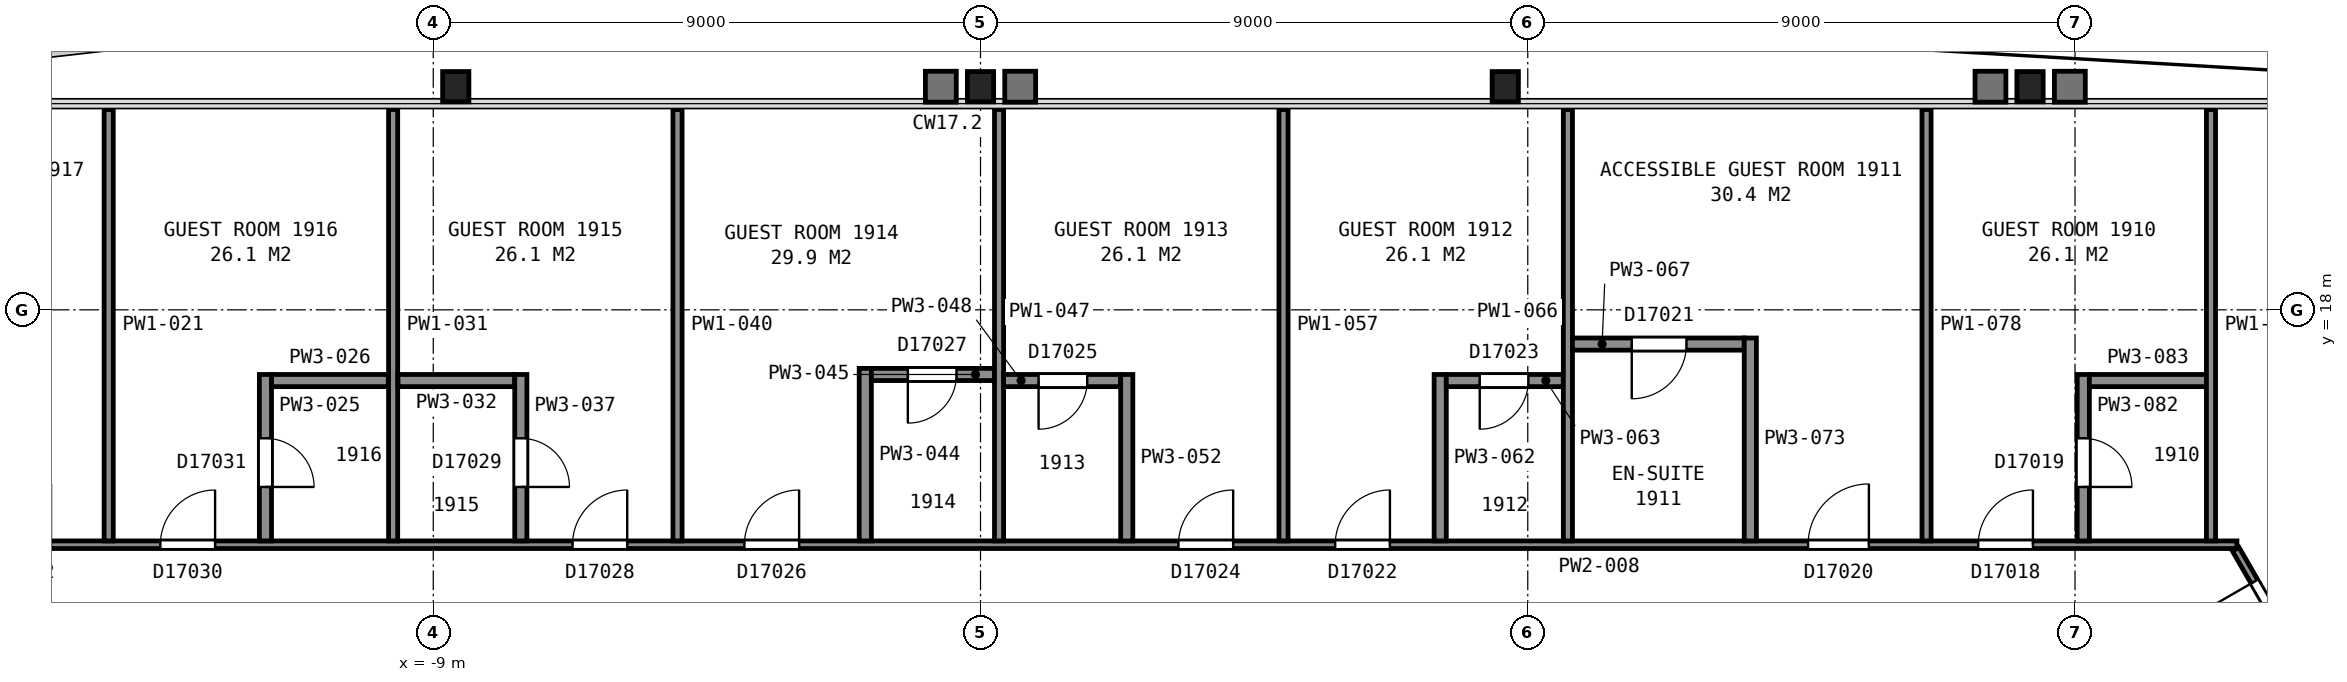
"""IFC4 building model, lengths in metres.
Left out: names, types, materials, properties, quantities, classifications, styles, units other than length and angle.
Written with IfcOpenShell. Run it as: python <this file> out.ifc"""

import sys

from ifc_helpers import new_model, si_unit, direction, frame, frame_2d, origin, origin_2d, place, context, subcontext, project, spatial, rectangle, i_section, extrude, element, fill, save


model = new_model("IFC4")
c1 = context("Model", 3, precision=1e-05, world=origin(), true_north=direction((0.0, 1.0)))
c2 = subcontext(c1, "Body", "Model", "MODEL_VIEW")
j1 = project(units=[si_unit("LENGTHUNIT", "METRE"), si_unit("PLANEANGLEUNIT", "RADIAN")], contexts=[c1])
p1 = place(None, origin())
s1 = spatial("IfcSite", under=j1, at=p1, CompositionType="ELEMENT")
p2 = place(p1, origin())
s2 = spatial("IfcBuilding", under=s1, at=p2, CompositionType="ELEMENT")
p3 = place(p2, frame((0.0, 0.0, 83.6)))
s3 = spatial("IfcBuildingStorey", under=s2, at=p3, CompositionType="ELEMENT", Elevation=83.6)
for number, where, z_axis, x_axis in (
    (1, (17.26, 21.67, 0.0), (0.0, 0.0, 1.0), (1.0, 0.0, 0.0)),
    (2, (8.63, 21.67, 0.0), (0.0, 0.0, 1.0), (1.0, 0.0, 0.0)),
    (3, (0.0, 21.67, 0.0), (0.0, 0.0, 1.0), (1.0, 0.0, 0.0)),
    (4, (-8.63, 21.67, 0.0), (0.0, 0.0, 1.0), (1.0, 0.0, 0.0)),
):
    element("IfcColumn", number, at=place(p3, frame(where, z_axis=z_axis, x_axis=x_axis)), inside=s3, PredefinedType="COLUMN", context=c2, shape_type="SweptSolid", body=[
        extrude(i_section(OverallWidth=0.432, OverallDepth=0.498, WebThickness=0.056, FlangeThickness=0.089, FilletRadius=0.015, at=origin_2d()), origin(), (0.0, 0.0, 1.0), 2.87),
    ])
p4 = place(p3, frame((-20.663, 14.137, 0.0), z_axis=(0.0, 0.0, 1.0), x_axis=(1.0, 0.0, 0.0)))
e5 = element("IfcWall", 5, at=p4, inside=s3, PredefinedType="PARTITIONING", context=c2, shape_type="SweptSolid", body=[
    extrude(rectangle(XDim=41.325, YDim=0.125, at=frame_2d((20.663, 0.0))), origin(), (0.0, 0.0, 1.0), 2.262),
])
p5 = place(p4, frame((37.071, 0.0, 0.0)))
e6 = element("IfcOpeningElement", 6, at=p5, cuts=e5, PredefinedType="OPENING", context=c2, shape_type="SweptSolid", body=[
    extrude(rectangle(XDim=0.9, YDim=2.1, at=frame_2d((0.45, 1.05))), frame((0.0, 0.073, 0.0), z_axis=(0.0, -1.0, 0.0), x_axis=(1.0, 0.0, 0.0)), (0.0, 0.0, 1.0), 0.145),
])
p6 = place(p4, frame((34.272, 0.0, 0.0)))
e7 = element("IfcOpeningElement", 7, at=p6, cuts=e5, PredefinedType="OPENING", context=c2, shape_type="SweptSolid", body=[
    extrude(rectangle(XDim=1.0, YDim=2.1, at=frame_2d((0.5, 1.05))), frame((0.0, 0.073, 0.0), z_axis=(0.0, -1.0, 0.0), x_axis=(1.0, 0.0, 0.0)), (0.0, 0.0, 1.0), 0.145),
])
p7 = place(p4, frame((26.496, 0.0, 0.0)))
e8 = element("IfcOpeningElement", 8, at=p7, cuts=e5, PredefinedType="OPENING", context=c2, shape_type="SweptSolid", body=[
    extrude(rectangle(XDim=0.9, YDim=2.1, at=frame_2d((0.45, 1.05))), frame((0.0, 0.073, 0.0), z_axis=(0.0, -1.0, 0.0), x_axis=(1.0, 0.0, 0.0)), (0.0, 0.0, 1.0), 0.145),
])
p8 = place(p4, frame((23.917, 0.0, 0.0)))
e9 = element("IfcOpeningElement", 9, at=p8, cuts=e5, PredefinedType="OPENING", context=c2, shape_type="SweptSolid", body=[
    extrude(rectangle(XDim=0.9, YDim=2.1, at=frame_2d((0.45, 1.05))), frame((0.0, 0.073, 0.0), z_axis=(0.0, -1.0, 0.0), x_axis=(1.0, 0.0, 0.0)), (0.0, 0.0, 1.0), 0.145),
])
p9 = place(p4, frame((16.78, 0.0, 0.0)))
e10 = element("IfcOpeningElement", 10, at=p9, cuts=e5, PredefinedType="OPENING", context=c2, shape_type="SweptSolid", body=[
    extrude(rectangle(XDim=0.9, YDim=2.1, at=frame_2d((0.45, 1.05))), frame((0.0, 0.073, 0.0), z_axis=(0.0, -1.0, 0.0), x_axis=(1.0, 0.0, 0.0)), (0.0, 0.0, 1.0), 0.145),
])
p10 = place(p4, frame((13.952, 0.0, 0.0)))
e11 = element("IfcOpeningElement", 11, at=p10, cuts=e5, PredefinedType="OPENING", context=c2, shape_type="SweptSolid", body=[
    extrude(rectangle(XDim=0.9, YDim=2.1, at=frame_2d((0.45, 1.05))), frame((0.0, 0.073, 0.0), z_axis=(0.0, -1.0, 0.0), x_axis=(1.0, 0.0, 0.0)), (0.0, 0.0, 1.0), 0.145),
])
p11 = place(p4, frame((7.175, 0.0, 0.0)))
e12 = element("IfcOpeningElement", 12, at=p11, cuts=e5, PredefinedType="OPENING", context=c2, shape_type="SweptSolid", body=[
    extrude(rectangle(XDim=0.9, YDim=2.1, at=frame_2d((0.45, 1.05))), frame((0.0, 0.073, 0.0), z_axis=(0.0, -1.0, 0.0), x_axis=(1.0, 0.0, 0.0)), (0.0, 0.0, 1.0), 0.145),
])
p12 = place(p4, frame((4.376, 0.0, 0.0)))
e13 = element("IfcOpeningElement", 13, at=p12, cuts=e5, PredefinedType="OPENING", context=c2, shape_type="SweptSolid", body=[
    extrude(rectangle(XDim=1.0, YDim=2.1, at=frame_2d((0.5, 1.05))), frame((0.0, 0.073, 0.0), z_axis=(0.0, -1.0, 0.0), x_axis=(1.0, 0.0, 0.0)), (0.0, 0.0, 1.0), 0.145),
])
p13 = place(p3, frame((-14.338, 14.199, 0.0), z_axis=(0.0, 0.0, 1.0), x_axis=(0.0, 1.0, 0.0)))
e14 = element("IfcWall", 14, at=p13, inside=s3, PredefinedType="PARTITIONING", context=c2, shape_type="SweptSolid", body=[
    extrude(rectangle(XDim=7.095, YDim=0.15, at=frame_2d((3.548, 0.0))), origin(), (0.0, 0.0, 1.0), 2.262),
])
p14 = place(p3, frame((-11.76, 16.937, 0.0), z_axis=(0.0, 0.0, 1.0), x_axis=(0.0, -1.0, 0.0)))
e15 = element("IfcWall", 15, at=p14, inside=s3, PredefinedType="PARTITIONING", context=c2, shape_type="SweptSolid", body=[
    extrude(rectangle(XDim=2.738, YDim=0.2, at=frame_2d((1.369, 0.0))), origin(), (0.0, 0.0, 1.0), 2.262),
])
p15 = place(p14, frame((1.05, 0.0, 0.0)))
e16 = element("IfcOpeningElement", 16, at=p15, cuts=e15, PredefinedType="OPENING", context=c2, shape_type="SweptSolid", body=[
    extrude(rectangle(XDim=0.8, YDim=2.1, at=frame_2d((0.4, 1.05))), frame((0.0, 0.11, 0.0), z_axis=(0.0, -1.0, 0.0), x_axis=(1.0, 0.0, 0.0)), (0.0, 0.0, 1.0), 0.22),
])
p16 = place(p3, frame((-11.66, 16.837, 0.0), z_axis=(0.0, 0.0, 1.0), x_axis=(1.0, 0.0, 0.0)))
e17 = element("IfcWall", 17, at=p16, inside=s3, PredefinedType="PARTITIONING", context=c2, shape_type="SweptSolid", body=[
    extrude(rectangle(XDim=1.92, YDim=0.2, at=frame_2d((0.96, 0.0))), origin(), (0.0, 0.0, 1.0), 2.262),
])
p17 = place(p3, frame((-9.66, 14.199, 0.0), z_axis=(0.0, 0.0, 1.0), x_axis=(0.0, 1.0, 0.0)))
e18 = element("IfcWall", 18, at=p17, inside=s3, PredefinedType="PARTITIONING", context=c2, shape_type="SweptSolid", body=[
    extrude(rectangle(XDim=7.095, YDim=0.15, at=frame_2d((3.548, 0.0))), origin(), (0.0, 0.0, 1.0), 2.262),
])
p18 = place(p3, frame((-9.58, 16.837, 0.0), z_axis=(0.0, 0.0, 1.0), x_axis=(1.0, 0.0, 0.0)))
e19 = element("IfcWall", 19, at=p18, inside=s3, PredefinedType="PARTITIONING", context=c2, shape_type="SweptSolid", body=[
    extrude(rectangle(XDim=1.92, YDim=0.2, at=frame_2d((0.96, 0.0))), origin(), (0.0, 0.0, 1.0), 2.262),
])
p19 = place(p3, frame((-7.56, 14.199, 0.0), z_axis=(0.0, 0.0, 1.0), x_axis=(0.0, 1.0, 0.0)))
e20 = element("IfcWall", 20, at=p19, inside=s3, PredefinedType="PARTITIONING", context=c2, shape_type="SweptSolid", body=[
    extrude(rectangle(XDim=2.738, YDim=0.2, at=frame_2d((1.369, 0.0))), origin(), (0.0, 0.0, 1.0), 2.262),
])
p20 = place(p19, frame((0.887, 0.0, 0.0)))
e21 = element("IfcOpeningElement", 21, at=p20, cuts=e20, PredefinedType="OPENING", context=c2, shape_type="SweptSolid", body=[
    extrude(rectangle(XDim=0.8, YDim=2.1, at=frame_2d((0.4, 1.05))), frame((0.0, 0.11, 0.0), z_axis=(0.0, -1.0, 0.0), x_axis=(1.0, 0.0, 0.0)), (0.0, 0.0, 1.0), 0.22),
])
p21 = place(p3, frame((-4.983, 14.199, 0.0), z_axis=(0.0, 0.0, 1.0), x_axis=(0.0, 1.0, 0.0)))
e22 = element("IfcWall", 22, at=p21, inside=s3, PredefinedType="PARTITIONING", context=c2, shape_type="SweptSolid", body=[
    extrude(rectangle(XDim=7.095, YDim=0.15, at=frame_2d((3.548, 0.0))), origin(), (0.0, 0.0, 1.0), 2.262),
])
p22 = place(p3, frame((-1.895, 14.199, 0.0), z_axis=(0.0, 0.0, 1.0), x_axis=(0.0, 1.0, 0.0)))
e23 = element("IfcWall", 23, at=p22, inside=s3, PredefinedType="PARTITIONING", context=c2, shape_type="SweptSolid", body=[
    extrude(rectangle(XDim=2.838, YDim=0.2, at=frame_2d((1.419, 0.0))), origin(), (0.0, 0.0, 1.0), 2.262),
])
p23 = place(p3, frame((0.23, 16.937, 0.0), z_axis=(0.0, 0.0, 1.0), x_axis=(-1.0, 0.0, 0.0)))
e24 = element("IfcWall", 24, at=p23, inside=s3, PredefinedType="PARTITIONING", context=c2, shape_type="SweptSolid", body=[
    extrude(rectangle(XDim=2.025, YDim=0.2, at=frame_2d((1.012, 0.0))), origin(), (0.0, 0.0, 1.0), 2.262),
])
p24 = place(p23, frame((0.625, 0.0, 0.0)))
e25 = element("IfcOpeningElement", 25, at=p24, cuts=e24, PredefinedType="OPENING", context=c2, shape_type="SweptSolid", body=[
    extrude(rectangle(XDim=0.8, YDim=2.1, at=frame_2d((0.4, 1.05))), frame((0.0, 0.11, 0.0), z_axis=(0.0, -1.0, 0.0), x_axis=(1.0, 0.0, 0.0)), (0.0, 0.0, 1.0), 0.22),
])
p25 = place(p3, frame((0.305, 14.199, 0.0), z_axis=(0.0, 0.0, 1.0), x_axis=(0.0, 1.0, 0.0)))
e26 = element("IfcWall", 26, at=p25, inside=s3, PredefinedType="PARTITIONING", context=c2, shape_type="SweptSolid", body=[
    extrude(rectangle(XDim=7.095, YDim=0.15, at=frame_2d((3.548, 0.0))), origin(), (0.0, 0.0, 1.0), 2.262),
])
p26 = place(p3, frame((2.305, 16.837, 0.0), z_axis=(0.0, 0.0, 1.0), x_axis=(-1.0, 0.0, 0.0)))
e27 = element("IfcWall", 27, at=p26, inside=s3, PredefinedType="PARTITIONING", context=c2, shape_type="SweptSolid", body=[
    extrude(rectangle(XDim=1.925, YDim=0.2, at=frame_2d((0.962, 0.0))), origin(), (0.0, 0.0, 1.0), 2.262),
])
p27 = place(p26, frame((0.55, 0.0, 0.0)))
e28 = element("IfcOpeningElement", 28, at=p27, cuts=e27, PredefinedType="OPENING", context=c2, shape_type="SweptSolid", body=[
    extrude(rectangle(XDim=0.8, YDim=2.1, at=frame_2d((0.4, 1.05))), frame((0.0, 0.11, 0.0), z_axis=(0.0, -1.0, 0.0), x_axis=(1.0, 0.0, 0.0)), (0.0, 0.0, 1.0), 0.22),
])
p28 = place(p3, frame((2.405, 14.199, 0.0), z_axis=(0.0, 0.0, 1.0), x_axis=(0.0, 1.0, 0.0)))
e29 = element("IfcWall", 29, at=p28, inside=s3, PredefinedType="PARTITIONING", context=c2, shape_type="SweptSolid", body=[
    extrude(rectangle(XDim=2.738, YDim=0.2, at=frame_2d((1.369, 0.0))), origin(), (0.0, 0.0, 1.0), 2.262),
])
p29 = place(p3, frame((4.983, 14.199, 0.0), z_axis=(0.0, 0.0, 1.0), x_axis=(0.0, 1.0, 0.0)))
e30 = element("IfcWall", 30, at=p29, inside=s3, PredefinedType="PARTITIONING", context=c2, shape_type="SweptSolid", body=[
    extrude(rectangle(XDim=7.095, YDim=0.15, at=frame_2d((3.548, 0.0))), origin(), (0.0, 0.0, 1.0), 2.262),
])
p30 = place(p3, frame((7.56, 14.199, 0.0), z_axis=(0.0, 0.0, 1.0), x_axis=(0.0, 1.0, 0.0)))
e31 = element("IfcWall", 31, at=p30, inside=s3, PredefinedType="PARTITIONING", context=c2, shape_type="SweptSolid", body=[
    extrude(rectangle(XDim=2.738, YDim=0.2, at=frame_2d((1.369, 0.0))), origin(), (0.0, 0.0, 1.0), 2.262),
])
p31 = place(p3, frame((9.585, 16.837, 0.0), z_axis=(0.0, 0.0, 1.0), x_axis=(-1.0, 0.0, 0.0)))
e32 = element("IfcWall", 32, at=p31, inside=s3, PredefinedType="PARTITIONING", context=c2, shape_type="SweptSolid", body=[
    extrude(rectangle(XDim=1.925, YDim=0.2, at=frame_2d((0.962, 0.0))), origin(), (0.0, 0.0, 1.0), 2.262),
])
p32 = place(p31, frame((0.575, 0.0, 0.0)))
e33 = element("IfcOpeningElement", 33, at=p32, cuts=e32, PredefinedType="OPENING", context=c2, shape_type="SweptSolid", body=[
    extrude(rectangle(XDim=0.8, YDim=2.1, at=frame_2d((0.4, 1.05))), frame((0.0, 0.11, 0.0), z_axis=(0.0, -1.0, 0.0), x_axis=(1.0, 0.0, 0.0)), (0.0, 0.0, 1.0), 0.22),
])
p33 = place(p3, frame((9.66, 14.199, 0.0), z_axis=(0.0, 0.0, 1.0), x_axis=(0.0, 1.0, 0.0)))
e34 = element("IfcWall", 34, at=p33, inside=s3, PredefinedType="PARTITIONING", context=c2, shape_type="SweptSolid", body=[
    extrude(rectangle(XDim=7.095, YDim=0.15, at=frame_2d((3.548, 0.0))), origin(), (0.0, 0.0, 1.0), 2.262),
])
p34 = place(p3, frame((12.56, 17.437, 0.0), z_axis=(0.0, 0.0, 1.0), x_axis=(-1.0, 0.0, 0.0)))
e35 = element("IfcWall", 35, at=p34, inside=s3, PredefinedType="PARTITIONING", context=c2, shape_type="SweptSolid", body=[
    extrude(rectangle(XDim=2.825, YDim=0.2, at=frame_2d((1.413, 0.0))), origin(), (0.0, 0.0, 1.0), 2.262),
])
p35 = place(p34, frame((0.95, 0.0, 0.0)))
e36 = element("IfcOpeningElement", 36, at=p35, cuts=e35, PredefinedType="OPENING", context=c2, shape_type="SweptSolid", body=[
    extrude(rectangle(XDim=0.9, YDim=2.1, at=frame_2d((0.45, 1.05))), frame((0.0, 0.11, 0.0), z_axis=(0.0, -1.0, 0.0), x_axis=(1.0, 0.0, 0.0)), (0.0, 0.0, 1.0), 0.22),
])
p36 = place(p3, frame((12.66, 14.199, 0.0), z_axis=(0.0, 0.0, 1.0), x_axis=(0.0, 1.0, 0.0)))
e37 = element("IfcWall", 37, at=p36, inside=s3, PredefinedType="PARTITIONING", context=c2, shape_type="SweptSolid", body=[
    extrude(rectangle(XDim=3.338, YDim=0.2, at=frame_2d((1.669, 0.0))), origin(), (0.0, 0.0, 1.0), 2.262),
])
p37 = place(p3, frame((15.558, 14.199, 0.0), z_axis=(0.0, 0.0, 1.0), x_axis=(0.0, 1.0, 0.0)))
e38 = element("IfcWall", 38, at=p37, inside=s3, PredefinedType="PARTITIONING", context=c2, shape_type="SweptSolid", body=[
    extrude(rectangle(XDim=7.095, YDim=0.15, at=frame_2d((3.548, 0.0))), origin(), (0.0, 0.0, 1.0), 2.262),
])
p38 = place(p3, frame((18.136, 16.937, 0.0), z_axis=(0.0, 0.0, 1.0), x_axis=(0.0, -1.0, 0.0)))
e39 = element("IfcWall", 39, at=p38, inside=s3, PredefinedType="PARTITIONING", context=c2, shape_type="SweptSolid", body=[
    extrude(rectangle(XDim=2.738, YDim=0.2, at=frame_2d((1.369, 0.0))), origin(), (0.0, 0.0, 1.0), 2.262),
])
p39 = place(p38, frame((1.05, 0.0, 0.0)))
e40 = element("IfcOpeningElement", 40, at=p39, cuts=e39, PredefinedType="OPENING", context=c2, shape_type="SweptSolid", body=[
    extrude(rectangle(XDim=0.8, YDim=2.1, at=frame_2d((0.4, 1.05))), frame((0.0, 0.11, 0.0), z_axis=(0.0, -1.0, 0.0), x_axis=(1.0, 0.0, 0.0)), (0.0, 0.0, 1.0), 0.22),
])
p40 = place(p3, frame((18.236, 16.837, 0.0), z_axis=(0.0, 0.0, 1.0), x_axis=(1.0, 0.0, 0.0)))
e41 = element("IfcWall", 41, at=p40, inside=s3, PredefinedType="PARTITIONING", context=c2, shape_type="SweptSolid", body=[
    extrude(rectangle(XDim=1.925, YDim=0.2, at=frame_2d((0.962, 0.0))), origin(), (0.0, 0.0, 1.0), 2.262),
])
p41 = place(p3, frame((20.236, 14.199, 0.0), z_axis=(0.0, 0.0, 1.0), x_axis=(0.0, 1.0, 0.0)))
e42 = element("IfcWall", 42, at=p41, inside=s3, PredefinedType="PARTITIONING", context=c2, shape_type="SweptSolid", body=[
    extrude(rectangle(XDim=7.095, YDim=0.15, at=frame_2d((3.548, 0.0))), origin(), (0.0, 0.0, 1.0), 2.262),
])
p42 = place(p3, frame((20.643, 14.063, 0.0), z_axis=(0.0, 0.0, 1.0), x_axis=(0.499647745683, -0.866228682412, 0.0)))
e43 = element("IfcWall", 43, at=p42, inside=s3, PredefinedType="PARTITIONING", context=c2, shape_type="SweptSolid", body=[
    extrude(rectangle(XDim=2.829, YDim=0.125, at=frame_2d((1.415, 0.0))), origin(), (0.0, 0.0, 1.0), 2.262),
])
p43 = place(p42, frame((0.615, 0.0, 0.0)))
e44 = element("IfcOpeningElement", 44, at=p43, cuts=e43, PredefinedType="OPENING", context=c2, shape_type="SweptSolid", body=[
    extrude(rectangle(XDim=1.5, YDim=2.1, at=frame_2d((0.75, 1.05))), frame((0.0, 0.073, 0.0), z_axis=(0.0, -1.0, 0.0), x_axis=(1.0, 0.0, 0.0)), (0.0, 0.0, 1.0), 0.145),
])
p44 = place(p5, origin())
e45 = element("IfcDoor", 45, at=p44, inside=s3, OperationType="SINGLE_SWING_RIGHT", PredefinedType="DOOR", context=c2, shape_type="SweptSolid", body=[
    extrude(rectangle(XDim=0.9, YDim=2.1, at=frame_2d((0.45, 1.05))), frame((0.0, 0.025, 0.0), z_axis=(0.0, -1.0, 0.0), x_axis=(1.0, 0.0, 0.0)), (0.0, 0.0, 1.0), 0.05),
])
fill(e6, e45)
p45 = place(p6, origin())
e46 = element("IfcDoor", 46, at=p45, inside=s3, OperationType="SINGLE_SWING_RIGHT", PredefinedType="DOOR", context=c2, shape_type="SweptSolid", body=[
    extrude(rectangle(XDim=1.0, YDim=2.1, at=frame_2d((0.5, 1.05))), frame((0.0, 0.025, 0.0), z_axis=(0.0, -1.0, 0.0), x_axis=(1.0, 0.0, 0.0)), (0.0, 0.0, 1.0), 0.05),
])
fill(e7, e46)
p46 = place(p7, origin())
e47 = element("IfcDoor", 47, at=p46, inside=s3, OperationType="SINGLE_SWING_RIGHT", PredefinedType="DOOR", context=c2, shape_type="SweptSolid", body=[
    extrude(rectangle(XDim=0.9, YDim=2.1, at=frame_2d((0.45, 1.05))), frame((0.0, 0.025, 0.0), z_axis=(0.0, -1.0, 0.0), x_axis=(1.0, 0.0, 0.0)), (0.0, 0.0, 1.0), 0.05),
])
fill(e8, e47)
p47 = place(p8, origin())
e48 = element("IfcDoor", 48, at=p47, inside=s3, OperationType="SINGLE_SWING_RIGHT", PredefinedType="DOOR", context=c2, shape_type="SweptSolid", body=[
    extrude(rectangle(XDim=0.9, YDim=2.1, at=frame_2d((0.45, 1.05))), frame((0.0, 0.025, 0.0), z_axis=(0.0, -1.0, 0.0), x_axis=(1.0, 0.0, 0.0)), (0.0, 0.0, 1.0), 0.05),
])
fill(e9, e48)
p48 = place(p9, origin())
e49 = element("IfcDoor", 49, at=p48, inside=s3, OperationType="SINGLE_SWING_RIGHT", PredefinedType="DOOR", context=c2, shape_type="SweptSolid", body=[
    extrude(rectangle(XDim=0.9, YDim=2.1, at=frame_2d((0.45, 1.05))), frame((0.0, 0.025, 0.0), z_axis=(0.0, -1.0, 0.0), x_axis=(1.0, 0.0, 0.0)), (0.0, 0.0, 1.0), 0.05),
])
fill(e10, e49)
p49 = place(p10, origin())
e50 = element("IfcDoor", 50, at=p49, inside=s3, OperationType="SINGLE_SWING_RIGHT", PredefinedType="DOOR", context=c2, shape_type="SweptSolid", body=[
    extrude(rectangle(XDim=0.9, YDim=2.1, at=frame_2d((0.45, 1.05))), frame((0.0, 0.025, 0.0), z_axis=(0.0, -1.0, 0.0), x_axis=(1.0, 0.0, 0.0)), (0.0, 0.0, 1.0), 0.05),
])
fill(e11, e50)
p50 = place(p11, origin())
e51 = element("IfcDoor", 51, at=p50, inside=s3, OperationType="SINGLE_SWING_RIGHT", PredefinedType="DOOR", context=c2, shape_type="SweptSolid", body=[
    extrude(rectangle(XDim=0.9, YDim=2.1, at=frame_2d((0.45, 1.05))), frame((0.0, 0.025, 0.0), z_axis=(0.0, -1.0, 0.0), x_axis=(1.0, 0.0, 0.0)), (0.0, 0.0, 1.0), 0.05),
])
fill(e12, e51)
p51 = place(p15, origin())
e52 = element("IfcDoor", 52, at=p51, inside=s3, OperationType="SINGLE_SWING_RIGHT", PredefinedType="DOOR", context=c2, shape_type="SweptSolid", body=[
    extrude(rectangle(XDim=0.8, YDim=2.1, at=frame_2d((0.4, 1.05))), frame((0.0, 0.025, 0.0), z_axis=(0.0, -1.0, 0.0), x_axis=(1.0, 0.0, 0.0)), (0.0, 0.0, 1.0), 0.05),
])
fill(e16, e52)
p52 = place(p20, origin())
e53 = element("IfcDoor", 53, at=p52, inside=s3, OperationType="SINGLE_SWING_LEFT", PredefinedType="DOOR", context=c2, shape_type="SweptSolid", body=[
    extrude(rectangle(XDim=0.8, YDim=2.1, at=frame_2d((0.4, 1.05))), frame((0.0, 0.025, 0.0), z_axis=(0.0, -1.0, 0.0), x_axis=(1.0, 0.0, 0.0)), (0.0, 0.0, 1.0), 0.05),
])
fill(e21, e53)
p53 = place(p24, origin())
e54 = element("IfcDoor", 54, at=p53, inside=s3, OperationType="SINGLE_SWING_RIGHT", PredefinedType="DOOR", context=c2, shape_type="SweptSolid", body=[
    extrude(rectangle(XDim=0.8, YDim=2.1, at=frame_2d((0.4, 1.05))), frame((0.0, 0.025, 0.0), z_axis=(0.0, -1.0, 0.0), x_axis=(1.0, 0.0, 0.0)), (0.0, 0.0, 1.0), 0.05),
])
fill(e25, e54)
p54 = place(p27, origin())
e55 = element("IfcDoor", 55, at=p54, inside=s3, OperationType="SINGLE_SWING_RIGHT", PredefinedType="DOOR", context=c2, shape_type="SweptSolid", body=[
    extrude(rectangle(XDim=0.8, YDim=2.1, at=frame_2d((0.4, 1.05))), frame((0.0, 0.025, 0.0), z_axis=(0.0, -1.0, 0.0), x_axis=(1.0, 0.0, 0.0)), (0.0, 0.0, 1.0), 0.05),
])
fill(e28, e55)
p55 = place(p32, origin())
e56 = element("IfcDoor", 56, at=p55, inside=s3, OperationType="SINGLE_SWING_RIGHT", PredefinedType="DOOR", context=c2, shape_type="SweptSolid", body=[
    extrude(rectangle(XDim=0.8, YDim=2.1, at=frame_2d((0.4, 1.05))), frame((0.0, 0.025, 0.0), z_axis=(0.0, -1.0, 0.0), x_axis=(1.0, 0.0, 0.0)), (0.0, 0.0, 1.0), 0.05),
])
fill(e33, e56)
p56 = place(p35, origin())
e57 = element("IfcDoor", 57, at=p56, inside=s3, OperationType="SINGLE_SWING_RIGHT", PredefinedType="DOOR", context=c2, shape_type="SweptSolid", body=[
    extrude(rectangle(XDim=0.9, YDim=2.1, at=frame_2d((0.45, 1.05))), frame((0.0, 0.025, 0.0), z_axis=(0.0, -1.0, 0.0), x_axis=(1.0, 0.0, 0.0)), (0.0, 0.0, 1.0), 0.05),
])
fill(e36, e57)
p57 = place(p39, origin())
e58 = element("IfcDoor", 58, at=p57, inside=s3, OperationType="SINGLE_SWING_RIGHT", PredefinedType="DOOR", context=c2, shape_type="SweptSolid", body=[
    extrude(rectangle(XDim=0.8, YDim=2.1, at=frame_2d((0.4, 1.05))), frame((0.0, 0.025, 0.0), z_axis=(0.0, -1.0, 0.0), x_axis=(1.0, 0.0, 0.0)), (0.0, 0.0, 1.0), 0.05),
])
fill(e40, e58)
p58 = place(p43, origin())
e59 = element("IfcDoor", 59, at=p58, inside=s3, OperationType="DOUBLE_DOOR_SINGLE_SWING", PredefinedType="DOOR", context=c2, shape_type="SweptSolid", body=[
    extrude(rectangle(XDim=1.5, YDim=2.1, at=frame_2d((0.75, 1.05))), frame((0.0, 0.025, 0.0), z_axis=(0.0, -1.0, 0.0), x_axis=(1.0, 0.0, 0.0)), (0.0, 0.0, 1.0), 0.05),
])
fill(e44, e59)
save(model, sys.argv[1])
